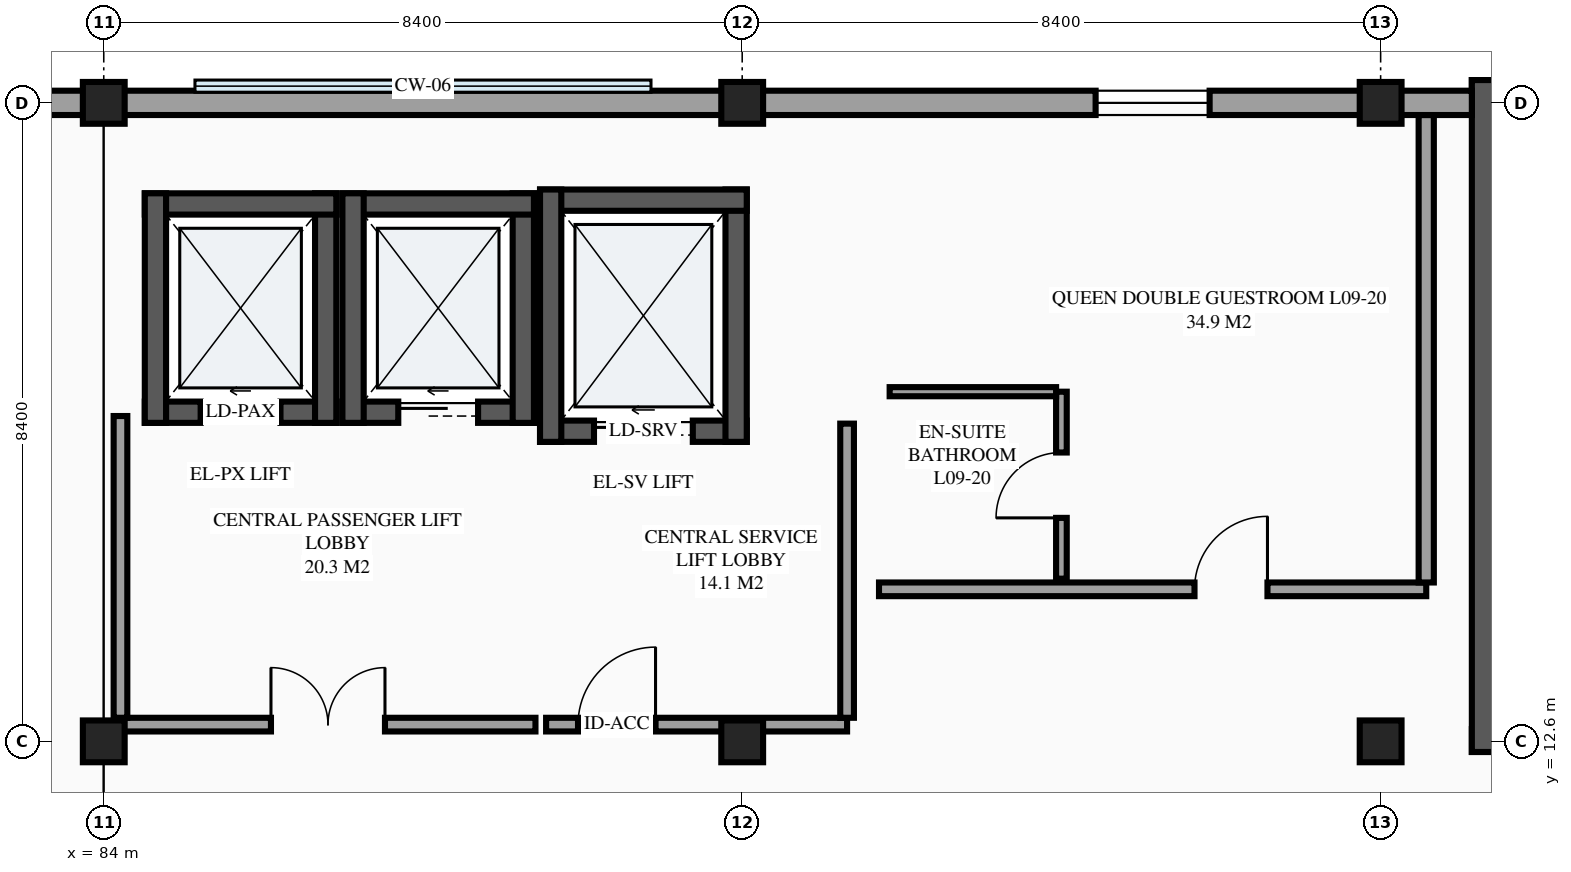
"""IFC4 building model, lengths in metres.
Left out: names, types, materials, properties, quantities, classifications, styles, units other than length and angle.
Written with IfcOpenShell. Run it as: python <this file> out.ifc"""

import sys

from ifc_helpers import new_model, si_unit, direction, frame, frame_2d, origin, origin_2d, place, context, subcontext, project, spatial, rectangle, extrude, element, fill, save


model = new_model("IFC4")
c1 = context("Model", 3, precision=1e-05, world=origin(), true_north=direction((0.0, 1.0)))
c2 = subcontext(c1, "Body", "Model", "MODEL_VIEW")
j1 = project(units=[si_unit("LENGTHUNIT", "METRE"), si_unit("PLANEANGLEUNIT", "RADIAN")], contexts=[c1])
p1 = place(None, origin())
s1 = spatial("IfcSite", under=j1, at=p1, CompositionType="ELEMENT")
p2 = place(p1, origin())
s2 = spatial("IfcBuilding", under=s1, at=p2, CompositionType="ELEMENT")
p3 = place(p2, frame((0.0, 0.0, 36.3)))
s3 = spatial("IfcBuildingStorey", under=s2, at=p3, CompositionType="ELEMENT", Elevation=36.3)
for number, where, z_axis, x_axis in (
    (1, (84.0, 12.6, 0.0), (0.0, 0.0, 1.0), (1.0, 0.0, 0.0)),
    (2, (84.0, 21.0, 0.0), (0.0, 0.0, 1.0), (1.0, 0.0, 0.0)),
    (3, (92.4, 12.6, 0.0), (0.0, 0.0, 1.0), (1.0, 0.0, 0.0)),
    (4, (92.4, 21.0, 0.0), (0.0, 0.0, 1.0), (1.0, 0.0, 0.0)),
    (5, (100.8, 12.6, 0.0), (0.0, 0.0, 1.0), (1.0, 0.0, 0.0)),
    (6, (100.8, 21.0, 0.0), (0.0, 0.0, 1.0), (1.0, 0.0, 0.0)),
):
    element("IfcColumn", number, at=place(p3, frame(where, z_axis=z_axis, x_axis=x_axis)), inside=s3, PredefinedType="COLUMN", context=c2, shape_type="SweptSolid", body=[
        extrude(rectangle(XDim=0.55, YDim=0.55, at=origin_2d()), origin(), (0.0, 0.0, 1.0), 3.6),
    ])
p4 = place(p3, frame((92.4, 21.0, 0.0), z_axis=(0.0, 0.0, 1.0), x_axis=(-1.0, 0.0, 0.0)))
e7 = element("IfcWall", 7, at=p4, inside=s3, PredefinedType="STANDARD", context=c2, shape_type="SweptSolid", body=[
    extrude(rectangle(XDim=8.4, YDim=0.32, at=frame_2d((4.2, 0.0))), origin(), (0.0, 0.0, 1.0), 3.126),
])
p5 = place(p3, frame((84.54, 16.93, 0.0), z_axis=(0.0, 0.0, 1.0), x_axis=(1.0, 0.0, 0.0)))
e8 = element("IfcWall", 8, at=p5, inside=s3, PredefinedType="SHEAR", context=c2, shape_type="SweptSolid", body=[
    extrude(rectangle(XDim=2.52, YDim=0.28, at=frame_2d((1.26, 0.0))), origin(), (0.0, 0.0, 1.0), 3.6),
])
p6 = place(p5, frame((0.735, 0.0, 0.0)))
e9 = element("IfcOpeningElement", 9, at=p6, cuts=e8, PredefinedType="OPENING", context=c2, shape_type="SweptSolid", body=[
    extrude(rectangle(XDim=1.05, YDim=2.2, at=frame_2d((0.525, 1.1))), frame((0.0, 0.15, 0.0), z_axis=(0.0, -1.0, 0.0), x_axis=(1.0, 0.0, 0.0)), (0.0, 0.0, 1.0), 0.3),
])
p7 = place(p3, frame((86.92, 16.79, 0.0), z_axis=(0.0, 0.0, 1.0), x_axis=(0.0, 1.0, 0.0)))
e10 = element("IfcWall", 10, at=p7, inside=s3, PredefinedType="SHEAR", context=c2, shape_type="SweptSolid", body=[
    extrude(rectangle(XDim=3.02, YDim=0.28, at=frame_2d((1.51, 0.0))), origin(), (0.0, 0.0, 1.0), 3.6),
])
p8 = place(p3, frame((87.06, 19.67, 0.0), z_axis=(0.0, 0.0, 1.0), x_axis=(-1.0, 0.0, 0.0)))
e11 = element("IfcWall", 11, at=p8, inside=s3, PredefinedType="SHEAR", context=c2, shape_type="SweptSolid", body=[
    extrude(rectangle(XDim=2.52, YDim=0.28, at=frame_2d((1.26, 0.0))), origin(), (0.0, 0.0, 1.0), 3.6),
])
p9 = place(p3, frame((84.68, 19.81, 0.0), z_axis=(0.0, 0.0, 1.0), x_axis=(0.0, -1.0, 0.0)))
e12 = element("IfcWall", 12, at=p9, inside=s3, PredefinedType="SHEAR", context=c2, shape_type="SweptSolid", body=[
    extrude(rectangle(XDim=3.02, YDim=0.28, at=frame_2d((1.51, 0.0))), origin(), (0.0, 0.0, 1.0), 3.6),
])
p10 = place(p3, frame((87.14, 16.93, 0.0), z_axis=(0.0, 0.0, 1.0), x_axis=(1.0, 0.0, 0.0)))
e13 = element("IfcWall", 13, at=p10, inside=s3, PredefinedType="SHEAR", context=c2, shape_type="SweptSolid", body=[
    extrude(rectangle(XDim=2.52, YDim=0.28, at=frame_2d((1.26, 0.0))), origin(), (0.0, 0.0, 1.0), 3.6),
])
p11 = place(p10, frame((0.735, 0.0, 0.0)))
e14 = element("IfcOpeningElement", 14, at=p11, cuts=e13, PredefinedType="OPENING", context=c2, shape_type="SweptSolid", body=[
    extrude(rectangle(XDim=1.05, YDim=2.2, at=frame_2d((0.525, 1.1))), frame((0.0, 0.15, 0.0), z_axis=(0.0, -1.0, 0.0), x_axis=(1.0, 0.0, 0.0)), (0.0, 0.0, 1.0), 0.3),
])
p12 = place(p3, frame((89.52, 16.79, 0.0), z_axis=(0.0, 0.0, 1.0), x_axis=(0.0, 1.0, 0.0)))
e15 = element("IfcWall", 15, at=p12, inside=s3, PredefinedType="SHEAR", context=c2, shape_type="SweptSolid", body=[
    extrude(rectangle(XDim=3.02, YDim=0.28, at=frame_2d((1.51, 0.0))), origin(), (0.0, 0.0, 1.0), 3.6),
])
p13 = place(p3, frame((89.66, 19.67, 0.0), z_axis=(0.0, 0.0, 1.0), x_axis=(-1.0, 0.0, 0.0)))
e16 = element("IfcWall", 16, at=p13, inside=s3, PredefinedType="SHEAR", context=c2, shape_type="SweptSolid", body=[
    extrude(rectangle(XDim=2.52, YDim=0.28, at=frame_2d((1.26, 0.0))), origin(), (0.0, 0.0, 1.0), 3.6),
])
p14 = place(p3, frame((87.28, 19.81, 0.0), z_axis=(0.0, 0.0, 1.0), x_axis=(0.0, -1.0, 0.0)))
e17 = element("IfcWall", 17, at=p14, inside=s3, PredefinedType="SHEAR", context=c2, shape_type="SweptSolid", body=[
    extrude(rectangle(XDim=3.02, YDim=0.28, at=frame_2d((1.51, 0.0))), origin(), (0.0, 0.0, 1.0), 3.6),
])
p15 = place(p3, frame((89.74, 16.68, 0.0), z_axis=(0.0, 0.0, 1.0), x_axis=(1.0, 0.0, 0.0)))
e18 = element("IfcWall", 18, at=p15, inside=s3, PredefinedType="SHEAR", context=c2, shape_type="SweptSolid", body=[
    extrude(rectangle(XDim=2.72, YDim=0.28, at=frame_2d((1.36, 0.0))), origin(), (0.0, 0.0, 1.0), 3.6),
])
p16 = place(p15, frame((0.71, 0.0, 0.0)))
e19 = element("IfcOpeningElement", 19, at=p16, cuts=e18, PredefinedType="OPENING", context=c2, shape_type="SweptSolid", body=[
    extrude(rectangle(XDim=1.3, YDim=2.25, at=frame_2d((0.65, 1.125))), frame((0.0, 0.15, 0.0), z_axis=(0.0, -1.0, 0.0), x_axis=(1.0, 0.0, 0.0)), (0.0, 0.0, 1.0), 0.3),
])
p17 = place(p3, frame((92.32, 16.54, 0.0), z_axis=(0.0, 0.0, 1.0), x_axis=(0.0, 1.0, 0.0)))
e20 = element("IfcWall", 20, at=p17, inside=s3, PredefinedType="SHEAR", context=c2, shape_type="SweptSolid", body=[
    extrude(rectangle(XDim=3.32, YDim=0.28, at=frame_2d((1.66, 0.0))), origin(), (0.0, 0.0, 1.0), 3.6),
])
p18 = place(p3, frame((92.46, 19.72, 0.0), z_axis=(0.0, 0.0, 1.0), x_axis=(-1.0, 0.0, 0.0)))
e21 = element("IfcWall", 21, at=p18, inside=s3, PredefinedType="SHEAR", context=c2, shape_type="SweptSolid", body=[
    extrude(rectangle(XDim=2.72, YDim=0.28, at=frame_2d((1.36, 0.0))), origin(), (0.0, 0.0, 1.0), 3.6),
])
p19 = place(p3, frame((89.88, 19.86, 0.0), z_axis=(0.0, 0.0, 1.0), x_axis=(0.0, -1.0, 0.0)))
e22 = element("IfcWall", 22, at=p19, inside=s3, PredefinedType="SHEAR", context=c2, shape_type="SweptSolid", body=[
    extrude(rectangle(XDim=3.32, YDim=0.28, at=frame_2d((1.66, 0.0))), origin(), (0.0, 0.0, 1.0), 3.6),
])
p20 = place(p3, frame((102.0, 12.61, 0.0), z_axis=(0.0, 0.0, 1.0), x_axis=(1.0, 0.0, 0.0)))
e23 = element("IfcWall", 23, at=p20, inside=s3, PredefinedType="SHEAR", context=c2, shape_type="SweptSolid", body=[
    extrude(rectangle(XDim=5.2, YDim=0.3, at=frame_2d((2.6, 0.0))), origin(), (0.0, 0.0, 1.0), 3.6),
])
p21 = place(p20, frame((2.025, 0.0, 0.0)))
e24 = element("IfcOpeningElement", 24, at=p21, cuts=e23, PredefinedType="OPENING", context=c2, shape_type="SweptSolid", body=[
    extrude(rectangle(XDim=1.15, YDim=2.15, at=frame_2d((0.575, 1.075))), frame((0.0, 0.16, 0.0), z_axis=(0.0, -1.0, 0.0), x_axis=(1.0, 0.0, 0.0)), (0.0, 0.0, 1.0), 0.32),
])
p22 = place(p3, frame((107.2, 21.15, 0.0), z_axis=(0.0, 0.0, 1.0), x_axis=(-1.0, 0.0, 0.0)))
e25 = element("IfcWall", 25, at=p22, inside=s3, PredefinedType="SHEAR", context=c2, shape_type="SweptSolid", body=[
    extrude(rectangle(XDim=5.2, YDim=0.3, at=frame_2d((2.6, 0.0))), origin(), (0.0, 0.0, 1.0), 3.6),
])
p23 = place(p3, frame((102.15, 21.3, 0.0), z_axis=(0.0, 0.0, 1.0), x_axis=(0.0, -1.0, 0.0)))
e26 = element("IfcWall", 26, at=p23, inside=s3, PredefinedType="SHEAR", context=c2, shape_type="SweptSolid", body=[
    extrude(rectangle(XDim=8.84, YDim=0.3, at=frame_2d((4.42, 0.0))), origin(), (0.0, 0.0, 1.0), 3.6),
])
p24 = place(p3, frame((94.2, 14.6, 0.0), z_axis=(0.0, 0.0, 1.0), x_axis=(1.0, 0.0, 0.0)))
e27 = element("IfcWall", 27, at=p24, inside=s3, PredefinedType="PARTITIONING", context=c2, shape_type="SweptSolid", body=[
    extrude(rectangle(XDim=7.2, YDim=0.18, at=frame_2d((3.6, 0.0))), origin(), (0.0, 0.0, 1.0), 3.375),
])
p25 = place(p24, frame((4.151, 0.0, 0.0)))
e28 = element("IfcOpeningElement", 28, at=p25, cuts=e27, PredefinedType="OPENING", context=c2, shape_type="SweptSolid", body=[
    extrude(rectangle(XDim=0.96, YDim=2.15, at=frame_2d((0.48, 1.075))), frame((0.0, 0.1, 0.0), z_axis=(0.0, -1.0, 0.0), x_axis=(1.0, 0.0, 0.0)), (0.0, 0.0, 1.0), 0.2),
])
p26 = place(p3, frame((101.4, 14.69, 0.0), z_axis=(0.0, 0.0, 1.0), x_axis=(0.0, 1.0, 0.0)))
e29 = element("IfcWall", 29, at=p26, inside=s3, PredefinedType="PARTITIONING", context=c2, shape_type="SweptSolid", body=[
    extrude(rectangle(XDim=6.15, YDim=0.2, at=frame_2d((3.075, 0.0))), origin(), (0.0, 0.0, 1.0), 3.375),
])
p27 = place(p3, frame((96.6, 14.74, 0.0), z_axis=(0.0, 0.0, 1.0), x_axis=(0.0, 1.0, 0.0)))
e30 = element("IfcWall", 30, at=p27, inside=s3, PredefinedType="PARTITIONING", context=c2, shape_type="SweptSolid", body=[
    extrude(rectangle(XDim=2.46, YDim=0.14, at=frame_2d((1.23, 0.0))), origin(), (0.0, 0.0, 1.0), 3.375),
])
p28 = place(p27, frame((0.8, 0.0, 0.0)))
e31 = element("IfcOpeningElement", 31, at=p28, cuts=e30, PredefinedType="OPENING", context=c2, shape_type="SweptSolid", body=[
    extrude(rectangle(XDim=0.86, YDim=2.1, at=frame_2d((0.43, 1.05))), frame((0.0, 0.08, 0.0), z_axis=(0.0, -1.0, 0.0), x_axis=(1.0, 0.0, 0.0)), (0.0, 0.0, 1.0), 0.16),
])
p29 = place(p3, frame((94.34, 17.2, 0.0), z_axis=(0.0, 0.0, 1.0), x_axis=(1.0, 0.0, 0.0)))
e32 = element("IfcWall", 32, at=p29, inside=s3, PredefinedType="PARTITIONING", context=c2, shape_type="SweptSolid", body=[
    extrude(rectangle(XDim=2.19, YDim=0.12, at=frame_2d((1.095, 0.0))), origin(), (0.0, 0.0, 1.0), 3.375),
])
p30 = place(p3, frame((84.22, 12.82, 0.0), z_axis=(0.0, 0.0, 1.0), x_axis=(1.0, 0.0, 0.0)))
e33 = element("IfcWall", 33, at=p30, inside=s3, PredefinedType="PARTITIONING", context=c2, shape_type="SweptSolid", body=[
    extrude(rectangle(XDim=5.46, YDim=0.18, at=frame_2d((2.73, 0.0))), origin(), (0.0, 0.0, 1.0), 2.63),
])
p31 = place(p30, frame((1.98, 0.0, 0.0)))
e34 = element("IfcOpeningElement", 34, at=p31, cuts=e33, PredefinedType="OPENING", context=c2, shape_type="SweptSolid", body=[
    extrude(rectangle(XDim=1.5, YDim=2.15, at=frame_2d((0.75, 1.075))), frame((0.0, 0.1, 0.0), z_axis=(0.0, -1.0, 0.0), x_axis=(1.0, 0.0, 0.0)), (0.0, 0.0, 1.0), 0.2),
])
p32 = place(p3, frame((84.22, 12.91, 0.0), z_axis=(0.0, 0.0, 1.0), x_axis=(0.0, 1.0, 0.0)))
e35 = element("IfcWall", 35, at=p32, inside=s3, PredefinedType="PARTITIONING", context=c2, shape_type="SweptSolid", body=[
    extrude(rectangle(XDim=3.97, YDim=0.18, at=frame_2d((1.985, 0.0))), origin(), (0.0, 0.0, 1.0), 2.48),
])
p33 = place(p3, frame((89.82, 12.82, 0.0), z_axis=(0.0, 0.0, 1.0), x_axis=(1.0, 0.0, 0.0)))
e36 = element("IfcWall", 36, at=p33, inside=s3, PredefinedType="PARTITIONING", context=c2, shape_type="SweptSolid", body=[
    extrude(rectangle(XDim=3.96, YDim=0.18, at=frame_2d((1.98, 0.0))), origin(), (0.0, 0.0, 1.0), 2.63),
])
p34 = place(p33, frame((0.42, 0.0, 0.0)))
e37 = element("IfcOpeningElement", 37, at=p34, cuts=e36, PredefinedType="OPENING", context=c2, shape_type="SweptSolid", body=[
    extrude(rectangle(XDim=1.02, YDim=2.15, at=frame_2d((0.51, 1.075))), frame((0.0, 0.1, 0.0), z_axis=(0.0, -1.0, 0.0), x_axis=(1.0, 0.0, 0.0)), (0.0, 0.0, 1.0), 0.2),
])
p35 = place(p3, frame((93.78, 12.91, 0.0), z_axis=(0.0, 0.0, 1.0), x_axis=(0.0, 1.0, 0.0)))
e38 = element("IfcWall", 38, at=p35, inside=s3, PredefinedType="PARTITIONING", context=c2, shape_type="SweptSolid", body=[
    extrude(rectangle(XDim=3.87, YDim=0.18, at=frame_2d((1.935, 0.0))), origin(), (0.0, 0.0, 1.0), 3.375),
])
p36 = place(p3, frame((102.0, 21.0, 0.0), z_axis=(0.0, 0.0, 1.0), x_axis=(-1.0, 0.0, 0.0)))
e39 = element("IfcWall", 39, at=p36, inside=s3, PredefinedType="STANDARD", context=c2, shape_type="SweptSolid", body=[
    extrude(rectangle(XDim=1.2, YDim=0.32, at=frame_2d((0.6, 0.0))), origin(), (0.0, 0.0, 1.0), 2.53),
])
p37 = place(p3, frame((100.8, 21.0, 0.0), z_axis=(0.0, 0.0, 1.0), x_axis=(-1.0, 0.0, 0.0)))
e40 = element("IfcWall", 40, at=p37, inside=s3, PredefinedType="STANDARD", context=c2, shape_type="SweptSolid", body=[
    extrude(rectangle(XDim=8.4, YDim=0.32, at=frame_2d((4.2, 0.0))), origin(), (0.0, 0.0, 1.0), 2.43),
])
p38 = place(p37, frame((2.25, 0.0, 0.85)))
e41 = element("IfcOpeningElement", 41, at=p38, cuts=e40, PredefinedType="OPENING", context=c2, shape_type="SweptSolid", body=[
    extrude(rectangle(XDim=1.5, YDim=1.5, at=frame_2d((0.75, 0.75))), frame((0.0, 0.17, 0.0), z_axis=(0.0, -1.0, 0.0), x_axis=(1.0, 0.0, 0.0)), (0.0, 0.0, 1.0), 0.34),
])
p39 = place(p3, frame((84.0, 21.0, 0.0), z_axis=(0.0, 0.0, 1.0), x_axis=(-1.0, 0.0, 0.0)))
e42 = element("IfcWall", 42, at=p39, inside=s3, PredefinedType="STANDARD", context=c2, shape_type="SweptSolid", body=[
    extrude(rectangle(XDim=2.0, YDim=0.32, at=frame_2d((1.0, 0.0))), origin(), (0.0, 0.0, 1.0), 2.68),
])
p40 = place(p38, origin())
e43 = element("IfcWindow", 43, at=p40, inside=s3, PartitioningType="SINGLE_PANEL", PredefinedType="WINDOW", context=c2, shape_type="SweptSolid", body=[
    extrude(rectangle(XDim=1.5, YDim=1.5, at=frame_2d((0.75, 0.75))), frame((0.0, 0.03, 0.0), z_axis=(0.0, -1.0, 0.0), x_axis=(1.0, 0.0, 0.0)), (0.0, 0.0, 1.0), 0.06),
])
fill(e41, e43)
p41 = place(p6, origin())
e44 = element("IfcDoor", 44, at=p41, inside=s3, OperationType="SLIDING_TO_LEFT", PredefinedType="DOOR", context=c2, shape_type="SweptSolid", body=[
    extrude(rectangle(XDim=1.05, YDim=2.2, at=frame_2d((0.525, 1.1))), frame((0.0, 0.025, 0.0), z_axis=(0.0, -1.0, 0.0), x_axis=(1.0, 0.0, 0.0)), (0.0, 0.0, 1.0), 0.05),
])
fill(e9, e44)
p42 = place(p11, origin())
e45 = element("IfcDoor", 45, at=p42, inside=s3, OperationType="SLIDING_TO_LEFT", PredefinedType="DOOR", context=c2, shape_type="SweptSolid", body=[
    extrude(rectangle(XDim=1.05, YDim=2.2, at=frame_2d((0.525, 1.1))), frame((0.0, 0.025, 0.0), z_axis=(0.0, -1.0, 0.0), x_axis=(1.0, 0.0, 0.0)), (0.0, 0.0, 1.0), 0.05),
])
fill(e14, e45)
p43 = place(p16, origin())
e46 = element("IfcDoor", 46, at=p43, inside=s3, OperationType="SLIDING_TO_LEFT", PredefinedType="DOOR", context=c2, shape_type="SweptSolid", body=[
    extrude(rectangle(XDim=1.3, YDim=2.25, at=frame_2d((0.65, 1.125))), frame((0.0, 0.025, 0.0), z_axis=(0.0, -1.0, 0.0), x_axis=(1.0, 0.0, 0.0)), (0.0, 0.0, 1.0), 0.05),
])
fill(e19, e46)
p44 = place(p25, origin())
e47 = element("IfcDoor", 47, at=p44, inside=s3, OperationType="SINGLE_SWING_RIGHT", PredefinedType="DOOR", context=c2, shape_type="SweptSolid", body=[
    extrude(rectangle(XDim=0.96, YDim=2.15, at=frame_2d((0.48, 1.075))), frame((0.0, 0.025, 0.0), z_axis=(0.0, -1.0, 0.0), x_axis=(1.0, 0.0, 0.0)), (0.0, 0.0, 1.0), 0.05),
])
fill(e28, e47)
p45 = place(p28, origin())
e48 = element("IfcDoor", 48, at=p45, inside=s3, OperationType="SINGLE_SWING_LEFT", PredefinedType="DOOR", context=c2, shape_type="SweptSolid", body=[
    extrude(rectangle(XDim=0.86, YDim=2.1, at=frame_2d((0.43, 1.05))), frame((0.0, 0.025, 0.0), z_axis=(0.0, -1.0, 0.0), x_axis=(1.0, 0.0, 0.0)), (0.0, 0.0, 1.0), 0.05),
])
fill(e31, e48)
p46 = place(p31, origin())
e49 = element("IfcDoor", 49, at=p46, inside=s3, OperationType="DOUBLE_DOOR_SINGLE_SWING", PredefinedType="DOOR", context=c2, shape_type="SweptSolid", body=[
    extrude(rectangle(XDim=1.5, YDim=2.15, at=frame_2d((0.75, 1.075))), frame((0.0, 0.025, 0.0), z_axis=(0.0, -1.0, 0.0), x_axis=(1.0, 0.0, 0.0)), (0.0, 0.0, 1.0), 0.05),
])
fill(e34, e49)
p47 = place(p34, origin())
e50 = element("IfcDoor", 50, at=p47, inside=s3, OperationType="SINGLE_SWING_RIGHT", PredefinedType="DOOR", context=c2, shape_type="SweptSolid", body=[
    extrude(rectangle(XDim=1.02, YDim=2.15, at=frame_2d((0.51, 1.075))), frame((0.0, 0.025, 0.0), z_axis=(0.0, -1.0, 0.0), x_axis=(1.0, 0.0, 0.0)), (0.0, 0.0, 1.0), 0.05),
])
fill(e37, e50)
save(model, sys.argv[1])
